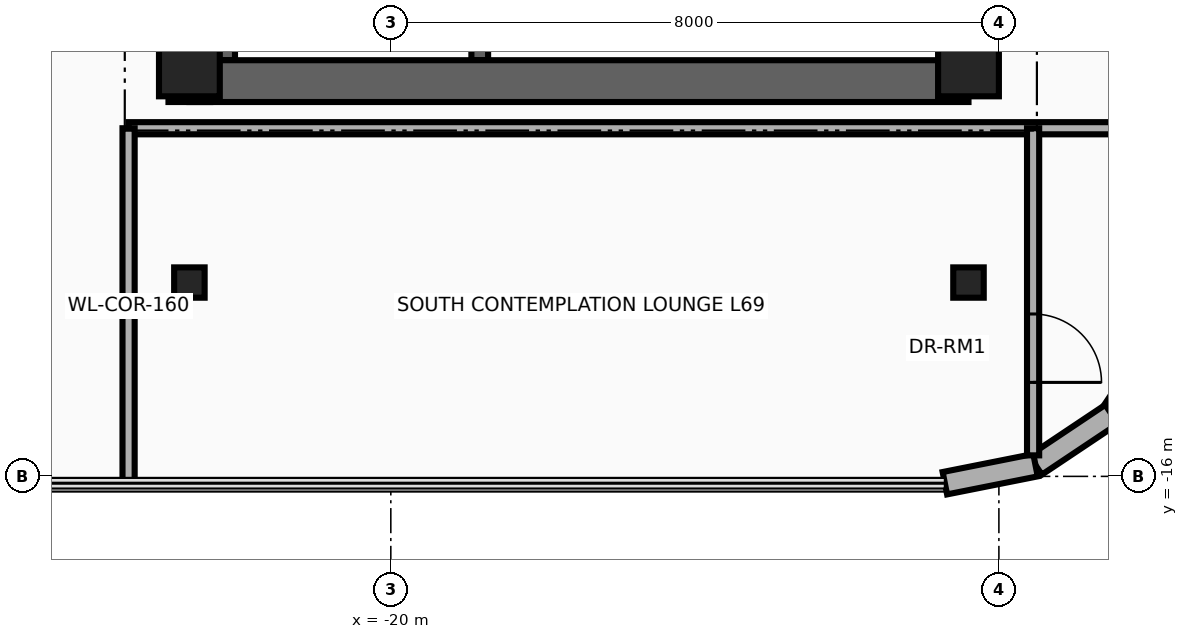
"""IFC4 building model, lengths in metres.
Left out: names, types, materials, properties, quantities, classifications, styles, units other than length and angle.
Written with IfcOpenShell. Run it as: python <this file> out.ifc"""

import sys

from ifc_helpers import new_model, si_unit, direction, frame, frame_2d, origin, origin_2d, place, context, subcontext, project, spatial, rectangle, i_section, extrude, source, transform, mapped, element, fill, save


model = new_model("IFC4")
c1 = context("Model", 3, precision=1e-05, world=origin(), true_north=direction((0.0, 1.0)))
c2 = subcontext(c1, "Body", "Model", "MODEL_VIEW")
j1 = project(units=[si_unit("LENGTHUNIT", "METRE"), si_unit("PLANEANGLEUNIT", "RADIAN")], contexts=[c1])
p1 = place(None, origin())
s1 = spatial("IfcSite", under=j1, at=p1, CompositionType="ELEMENT")
p2 = place(p1, origin())
s2 = spatial("IfcBuilding", under=s1, at=p2, CompositionType="ELEMENT")
p3 = place(p2, frame((0.0, 0.0, 266.0)))
s3 = spatial("IfcBuildingStorey", under=s2, at=p3, CompositionType="ELEMENT", Elevation=266.0)
for number, where, z_axis, x_axis in (
    (1, (-22.16, -10.525, 0.0), (0.0, 0.0, 1.0), (0.0, 1.0, 0.0)),
    (2, (-18.83, -10.525, 0.0), (0.0, 0.0, 1.0), (0.0, 1.0, 0.0)),
):
    element("IfcWall", number, at=place(p3, frame(where, z_axis=z_axis, x_axis=x_axis)), inside=s3, PredefinedType="SHEAR", context=c2, shape_type="SweptSolid", body=[
        extrude(rectangle(XDim=8.745, YDim=0.22, at=frame_2d((4.373, 0.0))), origin(), (0.0, 0.0, 1.0), 3.26),
    ])
p4 = place(p3, frame((-22.65, -11.075, 0.0), z_axis=(0.0, 0.0, 1.0), x_axis=(0.0, 1.0, 0.0)))
e3 = element("IfcWall", 3, at=p4, inside=s3, PredefinedType="SHEAR", context=c2, shape_type="SweptSolid", body=[
    extrude(rectangle(XDim=22.15, YDim=0.55, at=frame_2d((11.075, 0.0))), origin(), (0.0, 0.0, 1.0), 3.26),
])
p5 = place(p3, frame((-22.65, -10.8, 0.0), z_axis=(0.0, 0.0, 1.0), x_axis=(1.0, 0.0, 0.0)))
e4 = element("IfcWall", 4, at=p5, inside=s3, PredefinedType="SHEAR", context=c2, shape_type="SweptSolid", body=[
    extrude(rectangle(XDim=10.25, YDim=0.55, at=frame_2d((5.125, 0.0))), origin(), (0.0, 0.0, 1.0), 3.26),
])
m1 = source(origin(), c2, "Body", "SweptSolid", [
    extrude(rectangle(XDim=0.8, YDim=0.8, at=origin_2d()), origin(), (0.0, 0.0, 1.0), 3.5),
])
for number, where, z_axis, x_axis in (
    (5, (-22.65, -10.6, 0.0), (0.0, 0.0, 1.0), (1.0, 0.0, 0.0)),
    (6, (-12.4, -10.6, 0.0), (0.0, 0.0, 1.0), (1.0, 0.0, 0.0)),
):
    element("IfcColumn", number, at=place(p3, frame(where, z_axis=z_axis, x_axis=x_axis)), inside=s3, PredefinedType="COLUMN", context=c2, shape_type="MappedRepresentation", body=[
        mapped(m1, transform((0.0, 0.0, 0.0), x_axis=(1.0, 0.0, 0.0), y_axis=(0.0, 1.0, 0.0), z_axis=(0.0, 0.0, 1.0), scale=1.0)),
    ])
m2 = source(origin(), c2, "Body", "SweptSolid", [
    extrude(i_section(OverallWidth=0.401, OverallDepth=0.399, WebThickness=0.025, FlangeThickness=0.04, at=origin_2d()), origin(), (0.0, 0.0, 1.0), 3.5),
])
for number, where, z_axis, x_axis in (
    (7, (-22.65, -13.45, 0.0), (0.0, 0.0, 1.0), (1.0, 0.0, 0.0)),
    (8, (-12.4, -13.45, 0.0), (0.0, 0.0, 1.0), (1.0, 0.0, 0.0)),
):
    element("IfcColumn", number, at=place(p3, frame(where, z_axis=z_axis, x_axis=x_axis)), inside=s3, PredefinedType="COLUMN", context=c2, shape_type="MappedRepresentation", body=[
        mapped(m2, transform((0.0, 0.0, 0.0), x_axis=(1.0, 0.0, 0.0), y_axis=(0.0, 1.0, 0.0), z_axis=(0.0, 0.0, 1.0), scale=1.0)),
    ])
for number, where, z_axis, x_axis in (
    (9, (-9.847, -14.182, 0.0), (0.0, 0.0, 1.0), (-0.556, -0.831, 0.0)),
    (10, (-10.517, -15.183, 0.0), (0.0, 0.0, 1.0), (-0.831, -0.556, 0.0)),
):
    element("IfcWall", number, at=place(p3, frame(where, z_axis=z_axis, x_axis=x_axis)), inside=s3, PredefinedType="SOLIDWALL", context=c2, shape_type="SweptSolid", body=[
        extrude(rectangle(XDim=1.205, YDim=0.3, at=frame_2d((0.603, 0.0))), origin(), (0.0, 0.0, 1.0), 3.26),
    ])
p6 = place(p3, frame((-11.518, -15.853, 0.0), z_axis=(0.0, 0.0, 1.0), x_axis=(-0.980765602568, -0.195189223115, 0.0)))
e11 = element("IfcWall", 11, at=p6, inside=s3, PredefinedType="SOLIDWALL", context=c2, shape_type="SweptSolid", body=[
    extrude(rectangle(XDim=1.216, YDim=0.3, at=frame_2d((0.608, 0.0))), origin(), (0.0, 0.0, 1.0), 3.26),
])
p7 = place(p3, frame((-23.45, -11.42, 0.0), z_axis=(0.0, 0.0, 1.0), x_axis=(1.0, 0.0, 0.0)))
e12 = element("IfcWall", 12, at=p7, inside=s3, PredefinedType="PARTITIONING", context=c2, shape_type="SweptSolid", body=[
    extrude(rectangle(XDim=13.84, YDim=0.16, at=frame_2d((6.92, 0.0))), origin(), (0.0, 0.0, 1.0), 2.634),
])
p8 = place(p3, frame((-23.45, -16.09, 0.0), z_axis=(0.0, 0.0, 1.0), x_axis=(0.0, 1.0, 0.0)))
e13 = element("IfcWall", 13, at=p8, inside=s3, PredefinedType="PARTITIONING", context=c2, shape_type="SweptSolid", body=[
    extrude(rectangle(XDim=4.67, YDim=0.16, at=frame_2d((2.335, 0.0))), origin(), (0.0, 0.0, 1.0), 3.26),
])
p9 = place(p3, frame((-11.55, -15.724, 0.0), z_axis=(0.0, 0.0, 1.0), x_axis=(0.0, 1.0, 0.0)))
e14 = element("IfcWall", 14, at=p9, inside=s3, PredefinedType="PARTITIONING", context=c2, shape_type="SweptSolid", body=[
    extrude(rectangle(XDim=4.304, YDim=0.16, at=frame_2d((2.152, 0.0))), origin(), (0.0, 0.0, 1.0), 3.26),
])
p10 = place(p9, frame((0.96, 0.0, 0.0)))
e15 = element("IfcOpeningElement", 15, at=p10, cuts=e14, PredefinedType="OPENING", context=c2, shape_type="SweptSolid", body=[
    extrude(rectangle(XDim=0.9, YDim=2.1, at=frame_2d((0.45, 1.05))), frame((0.0, 0.095, 0.0), z_axis=(0.0, -1.0, 0.0), x_axis=(1.0, 0.0, 0.0)), (0.0, 0.0, 1.0), 0.19),
])
p11 = place(p10, frame((0.9, 0.0, 0.0), z_axis=(0.0, 0.0, 1.0), x_axis=(-1.0, 0.0, 0.0)))
e16 = element("IfcDoor", 16, at=p11, inside=s3, OperationType="SINGLE_SWING_LEFT", PredefinedType="DOOR", context=c2, shape_type="SweptSolid", body=[
    extrude(rectangle(XDim=0.9, YDim=2.1, at=frame_2d((0.45, 1.05))), frame((0.0, 0.025, 0.0), z_axis=(0.0, -1.0, 0.0), x_axis=(1.0, 0.0, 0.0)), (0.0, 0.0, 1.0), 0.05),
])
fill(e15, e16)
save(model, sys.argv[1])
